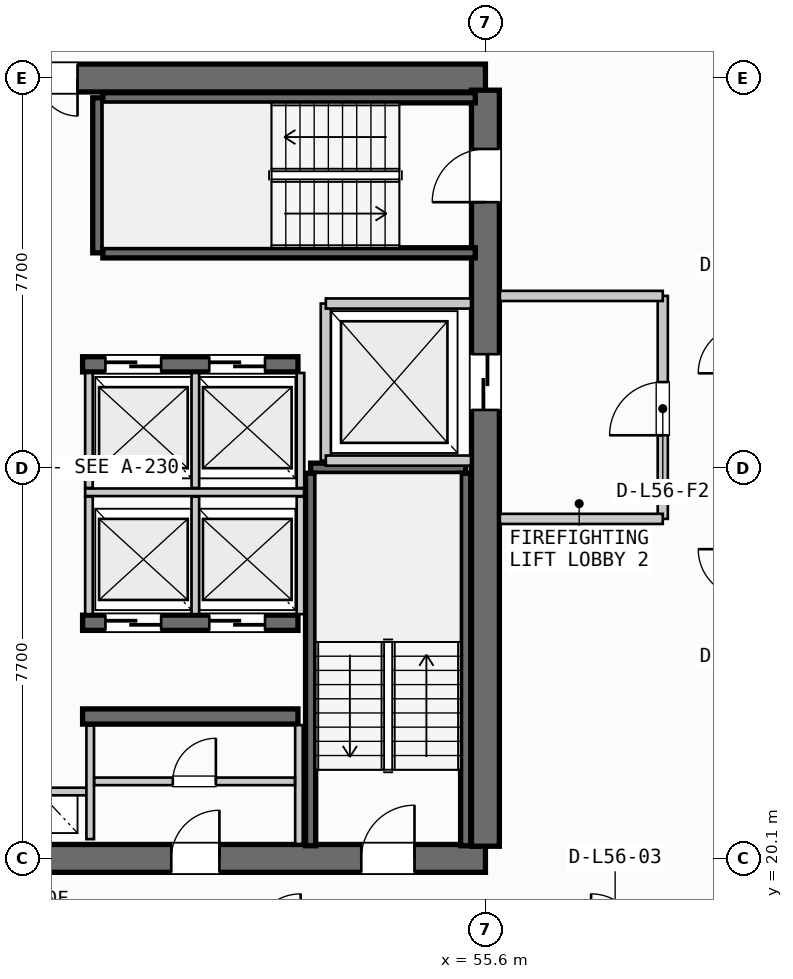
"""IFC4 building model, lengths in metres.
Left out: names, types, materials, properties, quantities, classifications, styles, units other than length and angle.
Written with IfcOpenShell. Run it as: python <this file> out.ifc"""

import sys

from ifc_helpers import new_model, si_unit, direction, frame, frame_2d, origin, place, context, subcontext, project, spatial, rectangle, extrude, source, transform, mapped, element, fill, save


model = new_model("IFC4")
c1 = context("Model", 3, precision=1e-05, world=origin(), true_north=direction((0.0, 1.0)))
c2 = subcontext(c1, "Body", "Model", "MODEL_VIEW")
j1 = project(units=[si_unit("LENGTHUNIT", "METRE"), si_unit("PLANEANGLEUNIT", "RADIAN")], contexts=[c1])
p1 = place(None, origin())
s1 = spatial("IfcSite", under=j1, at=p1, CompositionType="ELEMENT")
p2 = place(p1, origin())
s2 = spatial("IfcBuilding", under=s1, at=p2, CompositionType="ELEMENT")
p3 = place(p2, frame((0.0, 0.0, 214.9)))
s3 = spatial("IfcBuildingStorey", under=s2, at=p3, CompositionType="ELEMENT", Elevation=214.9)
p4 = place(p3, frame((38.0, 20.1, 0.0), z_axis=(0.0, 0.0, 1.0), x_axis=(1.0, 0.0, 0.0)))
e1 = element("IfcWall", 1, at=p4, inside=s3, PredefinedType="SHEAR", context=c2, shape_type="SweptSolid", body=[
    extrude(rectangle(XDim=17.6, YDim=0.55, at=frame_2d((8.8, 0.0))), origin(), (0.0, 0.0, 1.0), 3.24),
])
p5 = place(p4, frame((1.4, 0.0, 0.0)))
e2 = element("IfcOpeningElement", 2, at=p5, cuts=e1, PredefinedType="OPENING", context=c2, shape_type="SweptSolid", body=[
    extrude(rectangle(XDim=1.05, YDim=2.15, at=frame_2d((0.525, 1.075))), frame((0.0, 0.285, 0.0), z_axis=(0.0, -1.0, 0.0), x_axis=(1.0, 0.0, 0.0)), (0.0, 0.0, 1.0), 0.57),
])
p6 = place(p4, frame((15.15, 0.0, 0.0)))
e3 = element("IfcOpeningElement", 3, at=p6, cuts=e1, PredefinedType="OPENING", context=c2, shape_type="SweptSolid", body=[
    extrude(rectangle(XDim=1.05, YDim=2.15, at=frame_2d((0.525, 1.075))), frame((0.0, 0.285, 0.0), z_axis=(0.0, -1.0, 0.0), x_axis=(1.0, 0.0, 0.0)), (0.0, 0.0, 1.0), 0.57),
])
p7 = place(p4, frame((5.25, 0.0, 0.0)))
e4 = element("IfcOpeningElement", 4, at=p7, cuts=e1, PredefinedType="OPENING", context=c2, shape_type="SweptSolid", body=[
    extrude(rectangle(XDim=0.9, YDim=2.15, at=frame_2d((0.45, 1.075))), frame((0.0, 0.285, 0.0), z_axis=(0.0, -1.0, 0.0), x_axis=(1.0, 0.0, 0.0)), (0.0, 0.0, 1.0), 0.57),
])
p8 = place(p4, frame((11.4, 0.0, 0.0)))
e5 = element("IfcOpeningElement", 5, at=p8, cuts=e1, PredefinedType="OPENING", context=c2, shape_type="SweptSolid", body=[
    extrude(rectangle(XDim=0.95, YDim=2.15, at=frame_2d((0.475, 1.075))), frame((0.0, 0.285, 0.0), z_axis=(0.0, -1.0, 0.0), x_axis=(1.0, 0.0, 0.0)), (0.0, 0.0, 1.0), 0.57),
])
p9 = place(p3, frame((55.6, 35.5, 0.0), z_axis=(0.0, 0.0, 1.0), x_axis=(-1.0, 0.0, 0.0)))
e6 = element("IfcWall", 6, at=p9, inside=s3, PredefinedType="SHEAR", context=c2, shape_type="SweptSolid", body=[
    extrude(rectangle(XDim=17.6, YDim=0.55, at=frame_2d((8.8, 0.0))), origin(), (0.0, 0.0, 1.0), 3.24),
])
p10 = place(p9, frame((8.05, 0.0, 0.0)))
e7 = element("IfcOpeningElement", 7, at=p10, cuts=e6, PredefinedType="OPENING", context=c2, shape_type="SweptSolid", body=[
    extrude(rectangle(XDim=1.5, YDim=2.2, at=frame_2d((0.75, 1.1))), frame((0.0, 0.285, 0.0), z_axis=(0.0, -1.0, 0.0), x_axis=(1.0, 0.0, 0.0)), (0.0, 0.0, 1.0), 0.57),
])
p11 = place(p9, frame((15.1, 0.0, 0.0)))
e8 = element("IfcOpeningElement", 8, at=p11, cuts=e6, PredefinedType="OPENING", context=c2, shape_type="SweptSolid", body=[
    extrude(rectangle(XDim=0.95, YDim=2.15, at=frame_2d((0.475, 1.075))), frame((0.0, 0.285, 0.0), z_axis=(0.0, -1.0, 0.0), x_axis=(1.0, 0.0, 0.0)), (0.0, 0.0, 1.0), 0.57),
])
p12 = place(p9, frame((12.9, 0.0, 0.0)))
e9 = element("IfcOpeningElement", 9, at=p12, cuts=e6, PredefinedType="OPENING", context=c2, shape_type="SweptSolid", body=[
    extrude(rectangle(XDim=0.9, YDim=2.15, at=frame_2d((0.45, 1.075))), frame((0.0, 0.285, 0.0), z_axis=(0.0, -1.0, 0.0), x_axis=(1.0, 0.0, 0.0)), (0.0, 0.0, 1.0), 0.57),
])
p13 = place(p9, frame((10.6, 0.0, 0.0)))
e10 = element("IfcOpeningElement", 10, at=p13, cuts=e6, PredefinedType="OPENING", context=c2, shape_type="SweptSolid", body=[
    extrude(rectangle(XDim=0.95, YDim=2.15, at=frame_2d((0.475, 1.075))), frame((0.0, 0.285, 0.0), z_axis=(0.0, -1.0, 0.0), x_axis=(1.0, 0.0, 0.0)), (0.0, 0.0, 1.0), 0.57),
])
p14 = place(p3, frame((55.6, 20.34, 0.0), z_axis=(0.0, 0.0, 1.0), x_axis=(0.0, 1.0, 0.0)))
e11 = element("IfcWall", 11, at=p14, inside=s3, PredefinedType="SHEAR", context=c2, shape_type="SweptSolid", body=[
    extrude(rectangle(XDim=14.92, YDim=0.55, at=frame_2d((7.46, 0.0))), origin(), (0.0, 0.0, 1.0), 3.24),
])
p15 = place(p14, frame((12.71, 0.0, 0.0)))
e12 = element("IfcOpeningElement", 12, at=p15, cuts=e11, PredefinedType="OPENING", context=c2, shape_type="SweptSolid", body=[
    extrude(rectangle(XDim=1.05, YDim=2.15, at=frame_2d((0.525, 1.075))), frame((0.0, 0.285, 0.0), z_axis=(0.0, -1.0, 0.0), x_axis=(1.0, 0.0, 0.0)), (0.0, 0.0, 1.0), 0.57),
])
p16 = place(p14, frame((8.61, 0.0, 0.0)))
e13 = element("IfcOpeningElement", 13, at=p16, cuts=e11, PredefinedType="OPENING", context=c2, shape_type="SweptSolid", body=[
    extrude(rectangle(XDim=1.1, YDim=2.2, at=frame_2d((0.55, 1.1))), frame((0.0, 0.285, 0.0), z_axis=(0.0, -1.0, 0.0), x_axis=(1.0, 0.0, 0.0)), (0.0, 0.0, 1.0), 0.57),
])
p17 = place(p3, frame((47.65, 22.9, 0.0), z_axis=(0.0, 0.0, 1.0), x_axis=(1.0, 0.0, 0.0)))
e14 = element("IfcWall", 14, at=p17, inside=s3, PredefinedType="SHEAR", context=c2, shape_type="SweptSolid", body=[
    extrude(rectangle(XDim=4.25, YDim=0.3, at=frame_2d((2.125, 0.0))), origin(), (0.0, 0.0, 1.0), 3.24),
])
p18 = place(p3, frame((47.65, 24.75, 0.0), z_axis=(0.0, 0.0, 1.0), x_axis=(1.0, 0.0, 0.0)))
e15 = element("IfcWall", 15, at=p18, inside=s3, PredefinedType="SHEAR", context=c2, shape_type="SweptSolid", body=[
    extrude(rectangle(XDim=4.25, YDim=0.3, at=frame_2d((2.125, 0.0))), origin(), (0.0, 0.0, 1.0), 3.24),
])
p19 = place(p18, frame((0.45, 0.0, 0.0)))
e16 = element("IfcOpeningElement", 16, at=p19, cuts=e15, PredefinedType="OPENING", context=c2, shape_type="SweptSolid", body=[
    extrude(rectangle(XDim=1.1, YDim=2.2, at=frame_2d((0.55, 1.1))), frame((0.0, 0.16, 0.0), z_axis=(0.0, -1.0, 0.0), x_axis=(1.0, 0.0, 0.0)), (0.0, 0.0, 1.0), 0.32),
])
p20 = place(p18, frame((2.5, 0.0, 0.0)))
e17 = element("IfcOpeningElement", 17, at=p20, cuts=e15, PredefinedType="OPENING", context=c2, shape_type="SweptSolid", body=[
    extrude(rectangle(XDim=1.1, YDim=2.2, at=frame_2d((0.55, 1.1))), frame((0.0, 0.16, 0.0), z_axis=(0.0, -1.0, 0.0), x_axis=(1.0, 0.0, 0.0)), (0.0, 0.0, 1.0), 0.32),
])
p21 = place(p3, frame((47.65, 29.85, 0.0), z_axis=(0.0, 0.0, 1.0), x_axis=(1.0, 0.0, 0.0)))
e18 = element("IfcWall", 18, at=p21, inside=s3, PredefinedType="SHEAR", context=c2, shape_type="SweptSolid", body=[
    extrude(rectangle(XDim=4.25, YDim=0.3, at=frame_2d((2.125, 0.0))), origin(), (0.0, 0.0, 1.0), 3.24),
])
p22 = place(p21, frame((0.45, 0.0, 0.0)))
e19 = element("IfcOpeningElement", 19, at=p22, cuts=e18, PredefinedType="OPENING", context=c2, shape_type="SweptSolid", body=[
    extrude(rectangle(XDim=1.1, YDim=2.2, at=frame_2d((0.55, 1.1))), frame((0.0, 0.16, 0.0), z_axis=(0.0, -1.0, 0.0), x_axis=(1.0, 0.0, 0.0)), (0.0, 0.0, 1.0), 0.32),
])
p23 = place(p21, frame((2.5, 0.0, 0.0)))
e20 = element("IfcOpeningElement", 20, at=p23, cuts=e18, PredefinedType="OPENING", context=c2, shape_type="SweptSolid", body=[
    extrude(rectangle(XDim=1.1, YDim=2.2, at=frame_2d((0.55, 1.1))), frame((0.0, 0.16, 0.0), z_axis=(0.0, -1.0, 0.0), x_axis=(1.0, 0.0, 0.0)), (0.0, 0.0, 1.0), 0.32),
])
p24 = place(p3, frame((52.15, 27.8, 0.0), z_axis=(0.0, 0.0, 1.0), x_axis=(1.0, 0.0, 0.0)))
e21 = element("IfcWall", 21, at=p24, inside=s3, PredefinedType="SHEAR", context=c2, shape_type="SweptSolid", body=[
    extrude(rectangle(XDim=3.06, YDim=0.2, at=frame_2d((1.53, 0.0))), origin(), (0.0, 0.0, 1.0), 3.24),
])
for number, where, z_axis, x_axis in (
    (22, (55.21, 27.7, 0.0), (0.0, 0.0, 1.0), (0.0, -1.0, 0.0)),
    (23, (52.15, 20.35, 0.0), (0.0, 0.0, 1.0), (0.0, 1.0, 0.0)),
):
    element("IfcWall", number, at=place(p3, frame(where, z_axis=z_axis, x_axis=x_axis)), inside=s3, PredefinedType="SHEAR", context=c2, shape_type="SweptSolid", body=[
        extrude(rectangle(XDim=7.35, YDim=0.2, at=frame_2d((3.675, 0.0))), origin(), (0.0, 0.0, 1.0), 3.24),
    ])
p25 = place(p3, frame((47.95, 32.05, 0.0), z_axis=(0.0, 0.0, 1.0), x_axis=(0.0, 1.0, 0.0)))
e24 = element("IfcWall", 24, at=p25, inside=s3, PredefinedType="SHEAR", context=c2, shape_type="SweptSolid", body=[
    extrude(rectangle(XDim=3.06, YDim=0.2, at=frame_2d((1.53, 0.0))), origin(), (0.0, 0.0, 1.0), 3.24),
])
for number, where, z_axis, x_axis in (
    (25, (48.05, 35.11, 0.0), (0.0, 0.0, 1.0), (1.0, 0.0, 0.0)),
    (26, (55.4, 32.05, 0.0), (0.0, 0.0, 1.0), (-1.0, 0.0, 0.0)),
):
    element("IfcWall", number, at=place(p3, frame(where, z_axis=z_axis, x_axis=x_axis)), inside=s3, PredefinedType="SHEAR", context=c2, shape_type="SweptSolid", body=[
        extrude(rectangle(XDim=7.35, YDim=0.2, at=frame_2d((3.675, 0.0))), origin(), (0.0, 0.0, 1.0), 3.24),
    ])
p26 = place(p3, frame((45.8, 21.42, 0.0), z_axis=(0.0, 0.0, 1.0), x_axis=(1.0, 0.0, 0.0)))
e27 = element("IfcWall", 27, at=p26, inside=s3, PredefinedType="PARTITIONING", context=c2, shape_type="SweptSolid", body=[
    extrude(rectangle(XDim=2.0, YDim=0.15, at=frame_2d((1.0, 0.0))), origin(), (0.0, 0.0, 1.0), 2.295),
])
p27 = place(p3, frame((47.8, 20.48, 0.0), z_axis=(0.0, 0.0, 1.0), x_axis=(0.0, 1.0, 0.0)))
e28 = element("IfcWall", 28, at=p27, inside=s3, PredefinedType="PARTITIONING", context=c2, shape_type="SweptSolid", body=[
    extrude(rectangle(XDim=2.24, YDim=0.15, at=frame_2d((1.12, 0.0))), origin(), (0.0, 0.0, 1.0), 2.295),
])
p28 = place(p3, frame((52.45, 27.95, 0.0), z_axis=(0.0, 0.0, 1.0), x_axis=(0.0, 1.0, 0.0)))
e29 = element("IfcWall", 29, at=p28, inside=s3, PredefinedType="PARTITIONING", context=c2, shape_type="SweptSolid", body=[
    extrude(rectangle(XDim=3.1, YDim=0.2, at=frame_2d((1.55, 0.0))), origin(), (0.0, 0.0, 1.0), 2.295),
])
for number, where, z_axis, x_axis in (
    (30, (52.45, 27.95, 0.0), (0.0, 0.0, 1.0), (1.0, 0.0, 0.0)),
    (31, (52.45, 31.05, 0.0), (0.0, 0.0, 1.0), (1.0, 0.0, 0.0)),
):
    element("IfcWall", number, at=place(p3, frame(where, z_axis=z_axis, x_axis=x_axis)), inside=s3, PredefinedType="PARTITIONING", context=c2, shape_type="SweptSolid", body=[
        extrude(rectangle(XDim=2.865, YDim=0.2, at=frame_2d((1.433, 0.0))), origin(), (0.0, 0.0, 1.0), 2.295),
    ])
p29 = place(p3, frame((59.1, 26.8, 0.0), z_axis=(0.0, 0.0, 1.0), x_axis=(0.0, 1.0, 0.0)))
e32 = element("IfcWall", 32, at=p29, inside=s3, PredefinedType="PARTITIONING", context=c2, shape_type="SweptSolid", body=[
    extrude(rectangle(XDim=4.4, YDim=0.2, at=frame_2d((2.2, 0.0))), origin(), (0.0, 0.0, 1.0), 2.295),
])
p30 = place(p29, frame((1.65, 0.0, 0.0)))
e33 = element("IfcOpeningElement", 33, at=p30, cuts=e32, PredefinedType="OPENING", context=c2, shape_type="SweptSolid", body=[
    extrude(rectangle(XDim=1.05, YDim=2.15, at=frame_2d((0.525, 1.075))), frame((0.0, 0.11, 0.0), z_axis=(0.0, -1.0, 0.0), x_axis=(1.0, 0.0, 0.0)), (0.0, 0.0, 1.0), 0.22),
])
for number, where, z_axis, x_axis in (
    (34, (55.885, 26.8, 0.0), (0.0, 0.0, 1.0), (1.0, 0.0, 0.0)),
    (35, (55.885, 31.2, 0.0), (0.0, 0.0, 1.0), (1.0, 0.0, 0.0)),
):
    element("IfcWall", number, at=place(p3, frame(where, z_axis=z_axis, x_axis=x_axis)), inside=s3, PredefinedType="PARTITIONING", context=c2, shape_type="SweptSolid", body=[
        extrude(rectangle(XDim=3.215, YDim=0.2, at=frame_2d((1.607, 0.0))), origin(), (0.0, 0.0, 1.0), 2.295),
    ])
p31 = place(p3, frame((51.92, 20.385, 0.0), z_axis=(0.0, 0.0, 1.0), x_axis=(0.0, 1.0, 0.0)))
e36 = element("IfcWall", 36, at=p31, inside=s3, PredefinedType="PARTITIONING", context=c2, shape_type="SweptSolid", body=[
    extrude(rectangle(XDim=2.345, YDim=0.15, at=frame_2d((1.172, 0.0))), origin(), (0.0, 0.0, 1.0), 2.295),
])
p32 = place(p3, frame((47.88, 21.62, 0.0), z_axis=(0.0, 0.0, 1.0), x_axis=(1.0, 0.0, 0.0)))
e37 = element("IfcWall", 37, at=p32, inside=s3, PredefinedType="PARTITIONING", context=c2, shape_type="SweptSolid", body=[
    extrude(rectangle(XDim=3.96, YDim=0.15, at=frame_2d((1.98, 0.0))), origin(), (0.0, 0.0, 1.0), 2.295),
])
p33 = place(p32, frame((1.55, 0.0, 0.0)))
e38 = element("IfcOpeningElement", 38, at=p33, cuts=e37, PredefinedType="OPENING", context=c2, shape_type="SweptSolid", body=[
    extrude(rectangle(XDim=0.85, YDim=2.15, at=frame_2d((0.425, 1.075))), frame((0.0, 0.085, 0.0), z_axis=(0.0, -1.0, 0.0), x_axis=(1.0, 0.0, 0.0)), (0.0, 0.0, 1.0), 0.17),
])
p34 = place(p3, frame((47.7, 27.325, 0.0), z_axis=(0.0, 0.0, 1.0), x_axis=(1.0, 0.0, 0.0)))
e39 = element("IfcWall", 39, at=p34, inside=s3, PredefinedType="PARTITIONING", context=c2, shape_type="SweptSolid", body=[
    extrude(rectangle(XDim=4.32, YDim=0.15, at=frame_2d((2.16, 0.0))), origin(), (0.0, 0.0, 1.0), 2.295),
])
for number, where, z_axis, x_axis in (
    (40, (47.775, 24.92, 0.0), (0.0, 0.0, 1.0), (0.0, 1.0, 0.0)),
    (41, (49.875, 24.92, 0.0), (0.0, 0.0, 1.0), (0.0, 1.0, 0.0)),
    (42, (51.95, 24.92, 0.0), (0.0, 0.0, 1.0), (0.0, 1.0, 0.0)),
):
    element("IfcWall", number, at=place(p3, frame(where, z_axis=z_axis, x_axis=x_axis)), inside=s3, PredefinedType="PARTITIONING", context=c2, shape_type="SweptSolid", body=[
        extrude(rectangle(XDim=2.32, YDim=0.15, at=frame_2d((1.16, 0.0))), origin(), (0.0, 0.0, 1.0), 2.295),
    ])
for number, where, z_axis, x_axis in (
    (43, (47.775, 27.41, 0.0), (0.0, 0.0, 1.0), (0.0, 1.0, 0.0)),
    (44, (49.875, 27.41, 0.0), (0.0, 0.0, 1.0), (0.0, 1.0, 0.0)),
    (45, (51.95, 27.41, 0.0), (0.0, 0.0, 1.0), (0.0, 1.0, 0.0)),
):
    element("IfcWall", number, at=place(p3, frame(where, z_axis=z_axis, x_axis=x_axis)), inside=s3, PredefinedType="PARTITIONING", context=c2, shape_type="SweptSolid", body=[
        extrude(rectangle(XDim=2.27, YDim=0.15, at=frame_2d((1.135, 0.0))), origin(), (0.0, 0.0, 1.0), 2.295),
    ])
m1 = source(origin(), c2, "Body", "SweptSolid", [
    extrude(rectangle(XDim=1.05, YDim=2.15, at=frame_2d((0.525, 1.075))), frame((0.0, 0.025, 0.0), z_axis=(0.0, -1.0, 0.0), x_axis=(1.0, 0.0, 0.0)), (0.0, 0.0, 1.0), 0.05),
])
p35 = place(p6, origin())
e46 = element("IfcDoor", 46, at=p35, inside=s3, OperationType="SINGLE_SWING_RIGHT", PredefinedType="DOOR", context=c2, shape_type="MappedRepresentation", body=[
    mapped(m1, transform((0.0, 0.0, 0.0), scale=1.0)),
])
fill(e3, e46)
p36 = place(p15, origin())
e47 = element("IfcDoor", 47, at=p36, inside=s3, OperationType="SINGLE_SWING_LEFT", PredefinedType="DOOR", context=c2, shape_type="MappedRepresentation", body=[
    mapped(m1, transform((0.0, 0.0, 0.0), scale=1.0)),
])
fill(e12, e47)
m2 = source(origin(), c2, "Body", "SweptSolid", [
    extrude(rectangle(XDim=1.5, YDim=2.2, at=frame_2d((0.75, 1.1))), frame((0.0, 0.025, 0.0), z_axis=(0.0, -1.0, 0.0), x_axis=(1.0, 0.0, 0.0)), (0.0, 0.0, 1.0), 0.05),
])
p37 = place(p10, origin())
e48 = element("IfcDoor", 48, at=p37, inside=s3, OperationType="DOUBLE_DOOR_SINGLE_SWING", PredefinedType="DOOR", context=c2, shape_type="MappedRepresentation", body=[
    mapped(m2, transform((0.0, 0.0, 0.0), scale=1.0)),
])
fill(e7, e48)
m3 = source(origin(), c2, "Body", "SweptSolid", [
    extrude(rectangle(XDim=1.1, YDim=2.2, at=frame_2d((0.55, 1.1))), frame((0.0, 0.025, 0.0), z_axis=(0.0, -1.0, 0.0), x_axis=(1.0, 0.0, 0.0)), (0.0, 0.0, 1.0), 0.05),
])
p38 = place(p16, origin())
e49 = element("IfcDoor", 49, at=p38, inside=s3, OperationType="SLIDING_TO_RIGHT", PredefinedType="DOOR", context=c2, shape_type="MappedRepresentation", body=[
    mapped(m3, transform((0.0, 0.0, 0.0), scale=1.0)),
])
fill(e13, e49)
m4 = source(origin(), c2, "Body", "SweptSolid", [
    extrude(rectangle(XDim=0.95, YDim=2.15, at=frame_2d((0.475, 1.075))), frame((0.0, 0.025, 0.0), z_axis=(0.0, -1.0, 0.0), x_axis=(1.0, 0.0, 0.0)), (0.0, 0.0, 1.0), 0.05),
])
p39 = place(p8, origin())
e50 = element("IfcDoor", 50, at=p39, inside=s3, OperationType="SINGLE_SWING_RIGHT", PredefinedType="DOOR", context=c2, shape_type="MappedRepresentation", body=[
    mapped(m4, transform((0.0, 0.0, 0.0), scale=1.0)),
])
fill(e5, e50)
p40 = place(p19, origin())
e51 = element("IfcDoor", 51, at=p40, inside=s3, OperationType="SLIDING_TO_RIGHT", PredefinedType="DOOR", context=c2, shape_type="MappedRepresentation", body=[
    mapped(m3, transform((0.0, 0.0, 0.0), scale=1.0)),
])
fill(e16, e51)
p41 = place(p20, origin())
e52 = element("IfcDoor", 52, at=p41, inside=s3, OperationType="SLIDING_TO_RIGHT", PredefinedType="DOOR", context=c2, shape_type="MappedRepresentation", body=[
    mapped(m3, transform((0.0, 0.0, 0.0), scale=1.0)),
])
fill(e17, e52)
p42 = place(p22, origin())
e53 = element("IfcDoor", 53, at=p42, inside=s3, OperationType="SLIDING_TO_LEFT", PredefinedType="DOOR", context=c2, shape_type="MappedRepresentation", body=[
    mapped(m3, transform((0.0, 0.0, 0.0), scale=1.0)),
])
fill(e19, e53)
p43 = place(p23, origin())
e54 = element("IfcDoor", 54, at=p43, inside=s3, OperationType="SLIDING_TO_LEFT", PredefinedType="DOOR", context=c2, shape_type="MappedRepresentation", body=[
    mapped(m3, transform((0.0, 0.0, 0.0), scale=1.0)),
])
fill(e20, e54)
p44 = place(p30, origin())
e55 = element("IfcDoor", 55, at=p44, inside=s3, OperationType="SINGLE_SWING_LEFT", PredefinedType="DOOR", context=c2, shape_type="MappedRepresentation", body=[
    mapped(m1, transform((0.0, 0.0, 0.0), scale=1.0)),
])
fill(e33, e55)
m5 = source(origin(), c2, "Body", "SweptSolid", [
    extrude(rectangle(XDim=0.85, YDim=2.15, at=frame_2d((0.425, 1.075))), frame((0.0, 0.025, 0.0), z_axis=(0.0, -1.0, 0.0), x_axis=(1.0, 0.0, 0.0)), (0.0, 0.0, 1.0), 0.05),
])
p45 = place(p33, origin())
e56 = element("IfcDoor", 56, at=p45, inside=s3, OperationType="SINGLE_SWING_RIGHT", PredefinedType="DOOR", context=c2, shape_type="MappedRepresentation", body=[
    mapped(m5, transform((0.0, 0.0, 0.0), scale=1.0)),
])
fill(e38, e56)
save(model, sys.argv[1])
